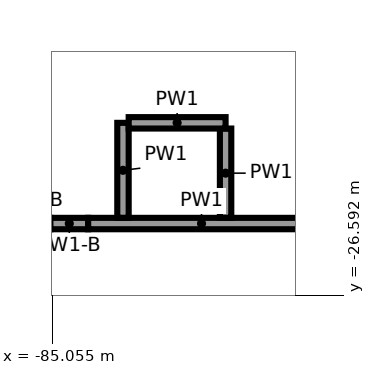
"""IFC4 building model, lengths in metres.
Left out: names, types, materials, properties, quantities, classifications, styles, units other than length and angle.
Written with IfcOpenShell. Run it as: python <this file> out.ifc"""

import sys

from ifc_helpers import new_model, si_unit, direction, frame, frame_2d, origin, place, context, subcontext, project, spatial, rectangle, extrude, element, save


model = new_model("IFC4")
c1 = context("Model", 3, precision=1e-05, world=origin(), true_north=direction((0.0, 1.0)))
c2 = subcontext(c1, "Body", "Model", "MODEL_VIEW")
j1 = project(units=[si_unit("LENGTHUNIT", "METRE"), si_unit("PLANEANGLEUNIT", "RADIAN")], contexts=[c1])
p1 = place(None, origin())
s1 = spatial("IfcSite", under=j1, at=p1, CompositionType="ELEMENT")
p2 = place(p1, origin())
s2 = spatial("IfcBuilding", under=s1, at=p2, CompositionType="ELEMENT")
p3 = place(p2, frame((0.0, 0.0, -4.0)))
s3 = spatial("IfcBuildingStorey", under=s2, at=p3, CompositionType="ELEMENT", Elevation=-4.0)
p4 = place(p3, frame((-85.08, -25.65, 0.0), z_axis=(0.0, 0.0, 1.0), x_axis=(1.0, 0.0, 0.0)))
e1 = element("IfcWall", 1, at=p4, inside=s3, PredefinedType="PARTITIONING", context=c2, shape_type="SweptSolid", body=[
    extrude(rectangle(XDim=0.497, YDim=0.15, at=frame_2d((0.249, 0.0))), origin(), (0.0, 0.0, 1.0), 2.5),
])
p5 = place(p3, frame((-84.583, -25.65, 0.0), z_axis=(0.0, 0.0, 1.0), x_axis=(1.0, 0.0, 0.0)))
e2 = element("IfcWall", 2, at=p5, inside=s3, PredefinedType="PARTITIONING", context=c2, shape_type="SweptSolid", body=[
    extrude(rectangle(XDim=2.983, YDim=0.15, at=frame_2d((1.491, 0.0))), origin(), (0.0, 0.0, 1.0), 3.6),
])
p6 = place(p3, frame((-84.125, -24.325, 0.0), z_axis=(0.0, 0.0, 1.0), x_axis=(0.0, -1.0, 0.0)))
e3 = element("IfcWall", 3, at=p6, inside=s3, PredefinedType="PARTITIONING", context=c2, shape_type="SweptSolid", body=[
    extrude(rectangle(XDim=1.249, YDim=0.15, at=frame_2d((0.625, 0.0))), origin(), (0.0, 0.0, 1.0), 3.6),
])
p7 = place(p3, frame((-82.775, -25.574, 0.0), z_axis=(0.0, 0.0, 1.0), x_axis=(0.0, 1.0, 0.0)))
e4 = element("IfcWall", 4, at=p7, inside=s3, PredefinedType="PARTITIONING", context=c2, shape_type="SweptSolid", body=[
    extrude(rectangle(XDim=1.174, YDim=0.15, at=frame_2d((0.587, 0.0))), origin(), (0.0, 0.0, 1.0), 3.6),
])
p8 = place(p3, frame((-82.775, -24.325, 0.0), z_axis=(0.0, 0.0, 1.0), x_axis=(-1.0, 0.0, 0.0)))
e5 = element("IfcWall", 5, at=p8, inside=s3, PredefinedType="PARTITIONING", context=c2, shape_type="SweptSolid", body=[
    extrude(rectangle(XDim=1.275, YDim=0.15, at=frame_2d((0.638, 0.0))), origin(), (0.0, 0.0, 1.0), 3.6),
])
save(model, sys.argv[1])
